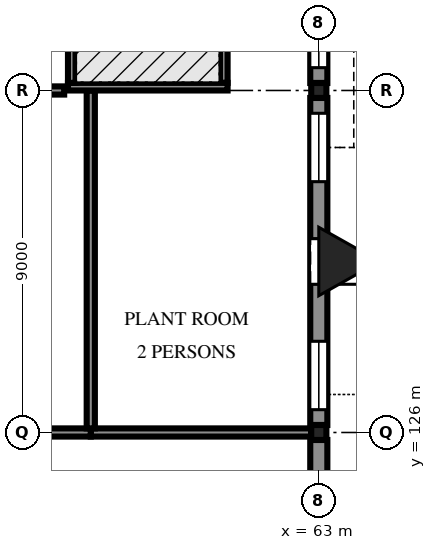
"""IFC4 building model, lengths in metres.
Left out: names, types, materials, properties, quantities, classifications, styles, units other than length and angle.
Written with IfcOpenShell. Run it as: python <this file> out.ifc"""

import sys

from ifc_helpers import new_model, si_unit, direction, frame, frame_2d, origin, origin_2d, place, context, subcontext, project, spatial, polyline, rectangle, i_section, outline, extrude, element, fill, save


model = new_model("IFC4")
c1 = context("Model", 3, precision=1e-05, world=origin(), true_north=direction((0.0, 1.0)))
c2 = subcontext(c1, "Body", "Model", "MODEL_VIEW")
j1 = project(units=[si_unit("LENGTHUNIT", "METRE"), si_unit("PLANEANGLEUNIT", "RADIAN")], contexts=[c1])
p1 = place(None, origin())
s1 = spatial("IfcSite", under=j1, at=p1, CompositionType="ELEMENT")
p2 = place(p1, origin())
s2 = spatial("IfcBuilding", under=s1, at=p2, CompositionType="ELEMENT")
p3 = place(p2, origin())
s3 = spatial("IfcBuildingStorey", under=s2, at=p3, CompositionType="ELEMENT", Elevation=0.0)
for number, where, z_axis, x_axis in (
    (1, (63.0, 126.0, -2.1), (0.0, 0.0, 1.0), (1.0, 0.0, 0.0)),
    (2, (63.0, 135.0, -2.1), (0.0, 0.0, 1.0), (1.0, 0.0, 0.0)),
):
    element("IfcColumn", number, at=place(p3, frame(where, z_axis=z_axis, x_axis=x_axis)), inside=s3, PredefinedType="COLUMN", context=c2, shape_type="SweptSolid", body=[
        extrude(i_section(OverallWidth=0.399, OverallDepth=0.394, WebThickness=0.016, FlangeThickness=0.025, FilletRadius=0.015, at=origin_2d()), origin(), (0.0, 0.0, 1.0), 9.6),
    ])
p4 = place(p3, frame((63.0, 124.8, 0.0), z_axis=(0.0, 0.0, 1.0), x_axis=(0.0, 1.0, 0.0)))
e3 = element("IfcWall", 3, at=p4, inside=s3, PredefinedType="SOLIDWALL", context=c2, shape_type="SweptSolid", body=[
    extrude(rectangle(XDim=1.003, YDim=0.45, at=frame_2d((0.501, 0.0))), origin(), (0.0, 0.0, 1.0), 6.46),
])
p5 = place(p3, frame((63.0, 126.197, 0.0), z_axis=(0.0, 0.0, 1.0), x_axis=(0.0, 1.0, 0.0)))
e4 = element("IfcWall", 4, at=p5, inside=s3, PredefinedType="SOLIDWALL", context=c2, shape_type="SweptSolid", body=[
    extrude(rectangle(XDim=8.606, YDim=0.45, at=frame_2d((4.303, 0.0))), origin(), (0.0, 0.0, 1.0), 6.46),
])
p6 = place(p5, frame((3.703, 0.0, 0.0)))
e5 = element("IfcOpeningElement", 5, at=p6, cuts=e4, PredefinedType="OPENING", context=c2, shape_type="SweptSolid", body=[
    extrude(rectangle(XDim=1.2, YDim=2.1, at=frame_2d((0.6, 1.05))), frame((0.0, 0.235, 0.0), z_axis=(0.0, -1.0, 0.0), x_axis=(1.0, 0.0, 0.0)), (0.0, 0.0, 1.0), 0.47),
])
p7 = place(p5, frame((3.703, 0.0, 2.55)))
e6 = element("IfcOpeningElement", 6, at=p7, cuts=e4, PredefinedType="OPENING", context=c2, shape_type="SweptSolid", body=[
    extrude(rectangle(XDim=1.2, YDim=0.6, at=frame_2d((0.6, 0.3))), frame((0.0, 0.235, 0.0), z_axis=(0.0, -1.0, 0.0), x_axis=(1.0, 0.0, 0.0)), (0.0, 0.0, 1.0), 0.47),
])
p8 = place(p5, frame((0.403, 0.0, 0.9)))
e7 = element("IfcOpeningElement", 7, at=p8, cuts=e4, PredefinedType="OPENING", context=c2, shape_type="SweptSolid", body=[
    extrude(rectangle(XDim=1.8, YDim=3.6, at=frame_2d((0.9, 1.8))), frame((0.0, 0.235, 0.0), z_axis=(0.0, -1.0, 0.0), x_axis=(1.0, 0.0, 0.0)), (0.0, 0.0, 1.0), 0.47),
])
p9 = place(p5, frame((6.403, 0.0, 0.9)))
e8 = element("IfcOpeningElement", 8, at=p9, cuts=e4, PredefinedType="OPENING", context=c2, shape_type="SweptSolid", body=[
    extrude(rectangle(XDim=1.8, YDim=3.6, at=frame_2d((0.9, 1.8))), frame((0.0, 0.235, 0.0), z_axis=(0.0, -1.0, 0.0), x_axis=(1.0, 0.0, 0.0)), (0.0, 0.0, 1.0), 0.47),
])
p10 = place(p3, frame((63.0, 135.197, 0.0), z_axis=(0.0, 0.0, 1.0), x_axis=(0.0, 1.0, 0.0)))
e9 = element("IfcWall", 9, at=p10, inside=s3, PredefinedType="SOLIDWALL", context=c2, shape_type="SweptSolid", body=[
    extrude(rectangle(XDim=8.606, YDim=0.45, at=frame_2d((4.303, 0.0))), origin(), (0.0, 0.0, 1.0), 6.46),
])
p11 = place(p10, frame((0.403, 0.0, 0.9)))
e10 = element("IfcOpeningElement", 10, at=p11, cuts=e9, PredefinedType="OPENING", context=c2, shape_type="SweptSolid", body=[
    extrude(rectangle(XDim=1.8, YDim=3.6, at=frame_2d((0.9, 1.8))), frame((0.0, 0.235, 0.0), z_axis=(0.0, -1.0, 0.0), x_axis=(1.0, 0.0, 0.0)), (0.0, 0.0, 1.0), 0.47),
])
p12 = place(p10, frame((3.403, 0.0, 0.9)))
e11 = element("IfcOpeningElement", 11, at=p12, cuts=e9, PredefinedType="OPENING", context=c2, shape_type="SweptSolid", body=[
    extrude(rectangle(XDim=1.8, YDim=3.6, at=frame_2d((0.9, 1.8))), frame((0.0, 0.235, 0.0), z_axis=(0.0, -1.0, 0.0), x_axis=(1.0, 0.0, 0.0)), (0.0, 0.0, 1.0), 0.47),
])
p13 = place(p10, frame((6.403, 0.0, 0.9)))
e12 = element("IfcOpeningElement", 12, at=p13, cuts=e9, PredefinedType="OPENING", context=c2, shape_type="SweptSolid", body=[
    extrude(rectangle(XDim=1.8, YDim=3.6, at=frame_2d((0.9, 1.8))), frame((0.0, 0.235, 0.0), z_axis=(0.0, -1.0, 0.0), x_axis=(1.0, 0.0, 0.0)), (0.0, 0.0, 1.0), 0.47),
])
p14 = place(p3, frame((56.4, 135.1, 0.0), z_axis=(0.0, 0.0, 1.0), x_axis=(1.0, 0.0, 0.0)))
e13 = element("IfcWall", 13, at=p14, inside=s3, PredefinedType="SOLIDWALL", context=c2, shape_type="SweptSolid", body=[
    extrude(rectangle(XDim=4.2, YDim=0.2, at=frame_2d((2.1, 0.0))), origin(), (0.0, 0.0, 1.0), 6.692),
])
p15 = place(p3, frame((56.5, 135.2, 0.0), z_axis=(0.0, 0.0, 1.0), x_axis=(0.0, 1.0, 0.0)))
e14 = element("IfcWall", 14, at=p15, inside=s3, PredefinedType="SOLIDWALL", context=c2, shape_type="SweptSolid", body=[
    extrude(rectangle(XDim=8.4, YDim=0.2, at=frame_2d((4.2, 0.0))), origin(), (0.0, 0.0, 1.0), 6.692),
])
p16 = place(p15, frame((0.9, 0.0, 0.0)))
e15 = element("IfcOpeningElement", 15, at=p16, cuts=e14, PredefinedType="OPENING", context=c2, shape_type="SweptSolid", body=[
    extrude(rectangle(XDim=1.8, YDim=2.1, at=frame_2d((0.9, 1.05))), frame((0.0, 0.11, 0.0), z_axis=(0.0, -1.0, 0.0), x_axis=(1.0, 0.0, 0.0)), (0.0, 0.0, 1.0), 0.22),
])
p17 = place(p3, frame((60.5, 135.2, 0.0), z_axis=(0.0, 0.0, 1.0), x_axis=(0.0, 1.0, 0.0)))
e16 = element("IfcWall", 16, at=p17, inside=s3, PredefinedType="SOLIDWALL", context=c2, shape_type="SweptSolid", body=[
    extrude(rectangle(XDim=8.4, YDim=0.2, at=frame_2d((4.2, 0.0))), origin(), (0.0, 0.0, 1.0), 6.692),
])
p18 = place(p3, frame((56.3, 135.0, 0.0), z_axis=(0.0, 0.0, 1.0), x_axis=(-1.0, 0.0, 0.0)))
e17 = element("IfcWall", 17, at=p18, inside=s3, PredefinedType="PARTITIONING", context=c2, shape_type="SweptSolid", body=[
    extrude(rectangle(XDim=1.8, YDim=0.215, at=frame_2d((0.9, 0.0))), origin(), (0.0, 0.0, 1.0), 6.6),
])
p19 = place(p3, frame((57.0, 126.0, 0.0), z_axis=(0.0, 0.0, 1.0), x_axis=(1.0, 0.0, 0.0)))
e18 = element("IfcWall", 18, at=p19, inside=s3, PredefinedType="PARTITIONING", context=c2, shape_type="SweptSolid", body=[
    extrude(rectangle(XDim=5.801, YDim=0.215, at=frame_2d((2.9, 0.0))), origin(), (0.0, 0.0, 1.0), 6.6),
])
p20 = place(p3, frame((54.5, 126.0, 0.0), z_axis=(0.0, 0.0, 1.0), x_axis=(1.0, 0.0, 0.0)))
e19 = element("IfcWall", 19, at=p20, inside=s3, PredefinedType="PARTITIONING", context=c2, shape_type="SweptSolid", body=[
    extrude(rectangle(XDim=2.5, YDim=0.215, at=frame_2d((1.25, 0.0))), origin(), (0.0, 0.0, 1.0), 6.6),
])
p21 = place(p3, frame((57.0, 134.998, 0.0), z_axis=(0.0, 0.0, 1.0), x_axis=(0.0, -1.0, 0.0)))
e20 = element("IfcWall", 20, at=p21, inside=s3, PredefinedType="PARTITIONING", context=c2, shape_type="SweptSolid", body=[
    extrude(rectangle(XDim=8.891, YDim=0.215, at=frame_2d((4.445, 0.0))), origin(), (0.0, 0.0, 1.0), 6.6),
])
p22 = place(p6, frame((1.2, 0.0, 0.0), z_axis=(0.0, 0.0, 1.0), x_axis=(-1.0, 0.0, 0.0)))
e21 = element("IfcDoor", 21, at=p22, inside=s3, OperationType="SINGLE_SWING_RIGHT", PredefinedType="DOOR", context=c2, shape_type="SweptSolid", body=[
    extrude(outline(polyline([(0.0, 0.0), (0.07, 0.0), (0.07, 2.03), (1.13, 2.03), (1.13, 0.0), (1.2, 0.0), (1.2, 2.1), (0.0, 2.1), (0.0, 0.0)])), frame((0.0, 0.025, 0.0), z_axis=(0.0, -1.0, 0.0), x_axis=(1.0, 0.0, 0.0)), (0.0, 0.0, 1.0), 0.05),
    extrude(outline(polyline([(0.074, 0.01), (1.126, 0.01), (1.126, 2.026), (0.074, 2.026), (0.074, 0.01)]), holes=[polyline([(0.194, 0.16), (1.006, 0.16), (1.006, 1.01), (0.194, 1.01), (0.194, 0.16)]), polyline([(0.45, 1.16), (0.75, 1.16), (0.75, 1.76), (0.45, 1.76), (0.45, 1.16)])]), frame((0.0, 0.017, 0.0), z_axis=(0.0, -1.0, 0.0), x_axis=(1.0, 0.0, 0.0)), (0.0, 0.0, 1.0), 0.035),
    extrude(rectangle(XDim=0.812, YDim=0.85, at=frame_2d((0.6, 0.585))), frame((0.0, 0.009, 0.0), z_axis=(0.0, -1.0, 0.0), x_axis=(1.0, 0.0, 0.0)), (0.0, 0.0, 1.0), 0.017),
    extrude(rectangle(XDim=0.3, YDim=0.6, at=frame_2d((0.6, 1.46))), frame((0.0, 0.006, 0.0), z_axis=(0.0, -1.0, 0.0), x_axis=(1.0, 0.0, 0.0)), (0.0, 0.0, 1.0), 0.012),
])
fill(e5, e21)
p23 = place(p7, origin())
e22 = element("IfcWindow", 22, at=p23, inside=s3, PartitioningType="SINGLE_PANEL", PredefinedType="WINDOW", context=c2, shape_type="SweptSolid", body=[
    extrude(outline(polyline([(0.0, 0.0), (1.2, 0.0), (1.2, 0.6), (0.0, 0.6), (0.0, 0.0)]), holes=[polyline([(0.07, 0.07), (1.13, 0.07), (1.13, 0.53), (0.07, 0.53), (0.07, 0.07)])]), frame((0.0, 0.03, 0.0), z_axis=(0.0, -1.0, 0.0), x_axis=(1.0, 0.0, 0.0)), (0.0, 0.0, 1.0), 0.06),
    extrude(outline(polyline([(0.07, 0.07), (1.13, 0.07), (1.13, 0.53), (0.07, 0.53), (0.07, 0.07)]), holes=[polyline([(0.1, 0.1), (1.1, 0.1), (1.1, 0.5), (0.1, 0.5), (0.1, 0.1)])]), frame((0.0, 0.022, 0.0), z_axis=(0.0, -1.0, 0.0), x_axis=(1.0, 0.0, 0.0)), (0.0, 0.0, 1.0), 0.045),
    extrude(rectangle(XDim=1.0, YDim=0.4, at=frame_2d((0.6, 0.3))), frame((0.0, 0.006, 0.0), z_axis=(0.0, -1.0, 0.0), x_axis=(1.0, 0.0, 0.0)), (0.0, 0.0, 1.0), 0.012),
])
fill(e6, e22)
p24 = place(p8, origin())
e23 = element("IfcWindow", 23, at=p24, inside=s3, PartitioningType="TRIPLE_PANEL_HORIZONTAL", PredefinedType="WINDOW", context=c2, shape_type="SweptSolid", body=[
    extrude(outline(polyline([(0.0, 0.0), (1.8, 0.0), (1.8, 3.6), (0.0, 3.6), (0.0, 0.0)]), holes=[polyline([(0.07, 0.07), (1.73, 0.07), (1.73, 3.53), (0.07, 3.53), (0.07, 0.07)])]), frame((0.0, 0.03, 0.0), z_axis=(0.0, -1.0, 0.0), x_axis=(1.0, 0.0, 0.0)), (0.0, 0.0, 1.0), 0.06),
    extrude(rectangle(XDim=1.66, YDim=0.04, at=frame_2d((0.9, 1.217))), frame((0.0, 0.021, 0.0), z_axis=(0.0, -1.0, 0.0), x_axis=(1.0, 0.0, 0.0)), (0.0, 0.0, 1.0), 0.043),
    extrude(rectangle(XDim=1.66, YDim=0.04, at=frame_2d((0.9, 2.383))), frame((0.0, 0.021, 0.0), z_axis=(0.0, -1.0, 0.0), x_axis=(1.0, 0.0, 0.0)), (0.0, 0.0, 1.0), 0.043),
    extrude(outline(polyline([(0.07, 0.07), (1.73, 0.07), (1.73, 1.197), (0.07, 1.197), (0.07, 0.07)]), holes=[polyline([(0.1, 0.1), (1.7, 0.1), (1.7, 1.167), (0.1, 1.167), (0.1, 0.1)])]), frame((0.0, 0.022, 0.0), z_axis=(0.0, -1.0, 0.0), x_axis=(1.0, 0.0, 0.0)), (0.0, 0.0, 1.0), 0.045),
    extrude(rectangle(XDim=1.6, YDim=1.067, at=frame_2d((0.9, 0.633))), frame((0.0, 0.006, 0.0), z_axis=(0.0, -1.0, 0.0), x_axis=(1.0, 0.0, 0.0)), (0.0, 0.0, 1.0), 0.012),
    extrude(outline(polyline([(0.07, 1.237), (1.73, 1.237), (1.73, 2.363), (0.07, 2.363), (0.07, 1.237)]), holes=[polyline([(0.1, 1.267), (1.7, 1.267), (1.7, 2.333), (0.1, 2.333), (0.1, 1.267)])]), frame((0.0, 0.022, 0.0), z_axis=(0.0, -1.0, 0.0), x_axis=(1.0, 0.0, 0.0)), (0.0, 0.0, 1.0), 0.045),
    extrude(rectangle(XDim=1.6, YDim=1.066, at=frame_2d((0.9, 1.8))), frame((0.0, 0.006, 0.0), z_axis=(0.0, -1.0, 0.0), x_axis=(1.0, 0.0, 0.0)), (0.0, 0.0, 1.0), 0.012),
    extrude(outline(polyline([(0.07, 2.403), (1.73, 2.403), (1.73, 3.53), (0.07, 3.53), (0.07, 2.403)]), holes=[polyline([(0.1, 2.433), (1.7, 2.433), (1.7, 3.5), (0.1, 3.5), (0.1, 2.433)])]), frame((0.0, 0.022, 0.0), z_axis=(0.0, -1.0, 0.0), x_axis=(1.0, 0.0, 0.0)), (0.0, 0.0, 1.0), 0.045),
    extrude(rectangle(XDim=1.6, YDim=1.067, at=frame_2d((0.9, 2.967))), frame((0.0, 0.006, 0.0), z_axis=(0.0, -1.0, 0.0), x_axis=(1.0, 0.0, 0.0)), (0.0, 0.0, 1.0), 0.012),
])
fill(e7, e23)
p25 = place(p9, origin())
e24 = element("IfcWindow", 24, at=p25, inside=s3, PartitioningType="TRIPLE_PANEL_HORIZONTAL", PredefinedType="WINDOW", context=c2, shape_type="SweptSolid", body=[
    extrude(outline(polyline([(0.0, 0.0), (1.8, 0.0), (1.8, 3.6), (0.0, 3.6), (0.0, 0.0)]), holes=[polyline([(0.07, 0.07), (1.73, 0.07), (1.73, 3.53), (0.07, 3.53), (0.07, 0.07)])]), frame((0.0, 0.03, 0.0), z_axis=(0.0, -1.0, 0.0), x_axis=(1.0, 0.0, 0.0)), (0.0, 0.0, 1.0), 0.06),
    extrude(rectangle(XDim=1.66, YDim=0.04, at=frame_2d((0.9, 1.217))), frame((0.0, 0.021, 0.0), z_axis=(0.0, -1.0, 0.0), x_axis=(1.0, 0.0, 0.0)), (0.0, 0.0, 1.0), 0.043),
    extrude(rectangle(XDim=1.66, YDim=0.04, at=frame_2d((0.9, 2.383))), frame((0.0, 0.021, 0.0), z_axis=(0.0, -1.0, 0.0), x_axis=(1.0, 0.0, 0.0)), (0.0, 0.0, 1.0), 0.043),
    extrude(outline(polyline([(0.07, 0.07), (1.73, 0.07), (1.73, 1.197), (0.07, 1.197), (0.07, 0.07)]), holes=[polyline([(0.1, 0.1), (1.7, 0.1), (1.7, 1.167), (0.1, 1.167), (0.1, 0.1)])]), frame((0.0, 0.022, 0.0), z_axis=(0.0, -1.0, 0.0), x_axis=(1.0, 0.0, 0.0)), (0.0, 0.0, 1.0), 0.045),
    extrude(rectangle(XDim=1.6, YDim=1.067, at=frame_2d((0.9, 0.633))), frame((0.0, 0.006, 0.0), z_axis=(0.0, -1.0, 0.0), x_axis=(1.0, 0.0, 0.0)), (0.0, 0.0, 1.0), 0.012),
    extrude(outline(polyline([(0.07, 1.237), (1.73, 1.237), (1.73, 2.363), (0.07, 2.363), (0.07, 1.237)]), holes=[polyline([(0.1, 1.267), (1.7, 1.267), (1.7, 2.333), (0.1, 2.333), (0.1, 1.267)])]), frame((0.0, 0.022, 0.0), z_axis=(0.0, -1.0, 0.0), x_axis=(1.0, 0.0, 0.0)), (0.0, 0.0, 1.0), 0.045),
    extrude(rectangle(XDim=1.6, YDim=1.066, at=frame_2d((0.9, 1.8))), frame((0.0, 0.006, 0.0), z_axis=(0.0, -1.0, 0.0), x_axis=(1.0, 0.0, 0.0)), (0.0, 0.0, 1.0), 0.012),
    extrude(outline(polyline([(0.07, 2.403), (1.73, 2.403), (1.73, 3.53), (0.07, 3.53), (0.07, 2.403)]), holes=[polyline([(0.1, 2.433), (1.7, 2.433), (1.7, 3.5), (0.1, 3.5), (0.1, 2.433)])]), frame((0.0, 0.022, 0.0), z_axis=(0.0, -1.0, 0.0), x_axis=(1.0, 0.0, 0.0)), (0.0, 0.0, 1.0), 0.045),
    extrude(rectangle(XDim=1.6, YDim=1.067, at=frame_2d((0.9, 2.967))), frame((0.0, 0.006, 0.0), z_axis=(0.0, -1.0, 0.0), x_axis=(1.0, 0.0, 0.0)), (0.0, 0.0, 1.0), 0.012),
])
fill(e8, e24)
p26 = place(p11, origin())
e25 = element("IfcWindow", 25, at=p26, inside=s3, PartitioningType="TRIPLE_PANEL_HORIZONTAL", PredefinedType="WINDOW", context=c2, shape_type="SweptSolid", body=[
    extrude(outline(polyline([(0.0, 0.0), (1.8, 0.0), (1.8, 3.6), (0.0, 3.6), (0.0, 0.0)]), holes=[polyline([(0.07, 0.07), (1.73, 0.07), (1.73, 3.53), (0.07, 3.53), (0.07, 0.07)])]), frame((0.0, 0.03, 0.0), z_axis=(0.0, -1.0, 0.0), x_axis=(1.0, 0.0, 0.0)), (0.0, 0.0, 1.0), 0.06),
    extrude(rectangle(XDim=1.66, YDim=0.04, at=frame_2d((0.9, 1.217))), frame((0.0, 0.021, 0.0), z_axis=(0.0, -1.0, 0.0), x_axis=(1.0, 0.0, 0.0)), (0.0, 0.0, 1.0), 0.043),
    extrude(rectangle(XDim=1.66, YDim=0.04, at=frame_2d((0.9, 2.383))), frame((0.0, 0.021, 0.0), z_axis=(0.0, -1.0, 0.0), x_axis=(1.0, 0.0, 0.0)), (0.0, 0.0, 1.0), 0.043),
    extrude(outline(polyline([(0.07, 0.07), (1.73, 0.07), (1.73, 1.197), (0.07, 1.197), (0.07, 0.07)]), holes=[polyline([(0.1, 0.1), (1.7, 0.1), (1.7, 1.167), (0.1, 1.167), (0.1, 0.1)])]), frame((0.0, 0.022, 0.0), z_axis=(0.0, -1.0, 0.0), x_axis=(1.0, 0.0, 0.0)), (0.0, 0.0, 1.0), 0.045),
    extrude(rectangle(XDim=1.6, YDim=1.067, at=frame_2d((0.9, 0.633))), frame((0.0, 0.006, 0.0), z_axis=(0.0, -1.0, 0.0), x_axis=(1.0, 0.0, 0.0)), (0.0, 0.0, 1.0), 0.012),
    extrude(outline(polyline([(0.07, 1.237), (1.73, 1.237), (1.73, 2.363), (0.07, 2.363), (0.07, 1.237)]), holes=[polyline([(0.1, 1.267), (1.7, 1.267), (1.7, 2.333), (0.1, 2.333), (0.1, 1.267)])]), frame((0.0, 0.022, 0.0), z_axis=(0.0, -1.0, 0.0), x_axis=(1.0, 0.0, 0.0)), (0.0, 0.0, 1.0), 0.045),
    extrude(rectangle(XDim=1.6, YDim=1.066, at=frame_2d((0.9, 1.8))), frame((0.0, 0.006, 0.0), z_axis=(0.0, -1.0, 0.0), x_axis=(1.0, 0.0, 0.0)), (0.0, 0.0, 1.0), 0.012),
    extrude(outline(polyline([(0.07, 2.403), (1.73, 2.403), (1.73, 3.53), (0.07, 3.53), (0.07, 2.403)]), holes=[polyline([(0.1, 2.433), (1.7, 2.433), (1.7, 3.5), (0.1, 3.5), (0.1, 2.433)])]), frame((0.0, 0.022, 0.0), z_axis=(0.0, -1.0, 0.0), x_axis=(1.0, 0.0, 0.0)), (0.0, 0.0, 1.0), 0.045),
    extrude(rectangle(XDim=1.6, YDim=1.067, at=frame_2d((0.9, 2.967))), frame((0.0, 0.006, 0.0), z_axis=(0.0, -1.0, 0.0), x_axis=(1.0, 0.0, 0.0)), (0.0, 0.0, 1.0), 0.012),
])
fill(e10, e25)
save(model, sys.argv[1])
